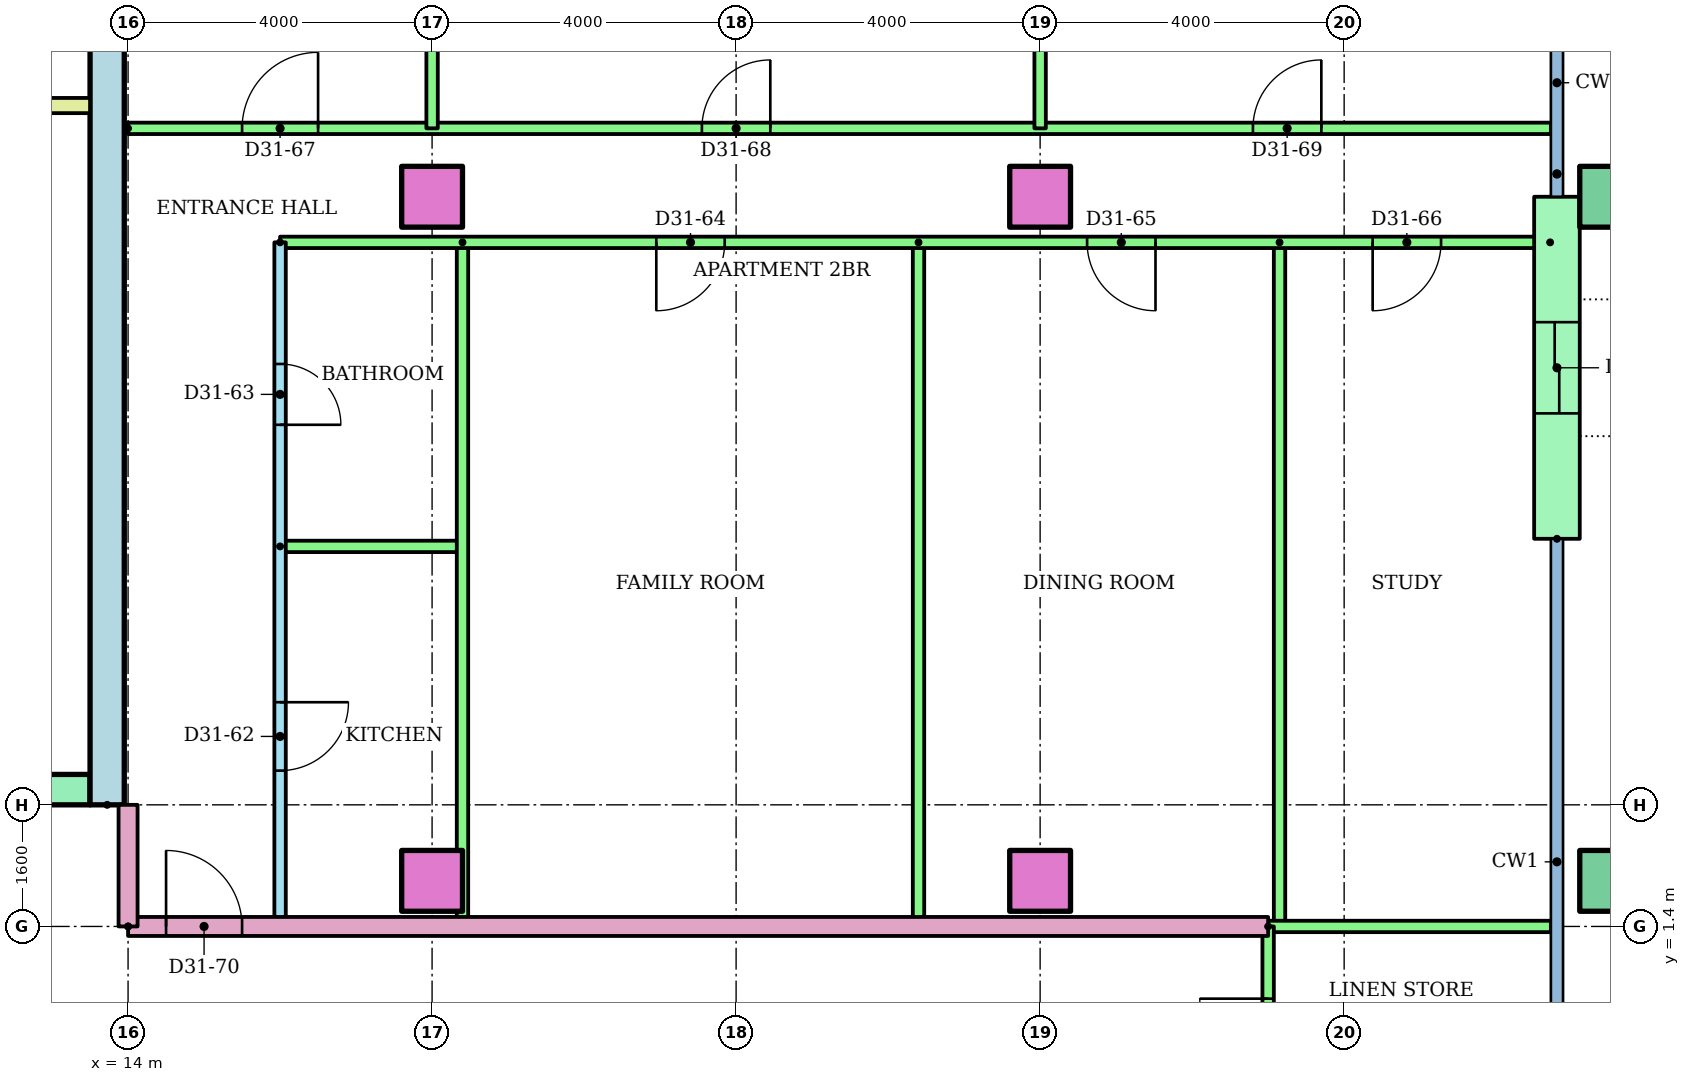
"""IFC4 building model, lengths in metres.
Left out: names, types, materials, properties, quantities, classifications, styles, units other than length and angle.
Written with IfcOpenShell. Run it as: python <this file> out.ifc"""

import sys

from ifc_helpers import new_model, si_unit, direction, frame, frame_2d, origin, origin_2d, place, context, subcontext, project, spatial, rectangle, hollow_rectangle, extrude, element, fill, save


model = new_model("IFC4")
c1 = context("Model", 3, precision=1e-05, world=origin(), true_north=direction((0.0, 1.0)))
c2 = subcontext(c1, "Body", "Model", "MODEL_VIEW")
j1 = project(units=[si_unit("LENGTHUNIT", "METRE"), si_unit("PLANEANGLEUNIT", "RADIAN")], contexts=[c1])
p1 = place(None, origin())
s1 = spatial("IfcSite", under=j1, at=p1, CompositionType="ELEMENT")
p2 = place(p1, origin())
s2 = spatial("IfcBuilding", under=s1, at=p2, CompositionType="ELEMENT")
p3 = place(p2, frame((0.0, 0.0, 123.0)))
s3 = spatial("IfcBuildingStorey", under=s2, at=p3, CompositionType="ELEMENT", Elevation=123.0)
for number, where in (
    (1, (18.0, 2.0, 0.0)),
    (2, (26.0, 2.0, 0.0)),
):
    element("IfcColumn", number, at=place(p3, frame(where)), inside=s3, PredefinedType="COLUMN", context=c2, shape_type="SweptSolid", body=[
        extrude(rectangle(XDim=0.8, YDim=0.8, at=origin_2d()), origin(), (0.0, 0.0, 1.0), 3.2),
    ])
p4 = place(p3, frame((33.5, 2.0, 0.0)))
e3 = element("IfcColumn", 3, at=p4, inside=s3, PredefinedType="COLUMN", context=c2, shape_type="SweptSolid", body=[
    extrude(hollow_rectangle(XDim=0.8, YDim=0.8, WallThickness=0.04, at=origin_2d()), origin(), (0.0, 0.0, 1.0), 3.2),
])
for number, where in (
    (4, (18.0, 11.0, 0.0)),
    (5, (26.0, 11.0, 0.0)),
):
    element("IfcColumn", number, at=place(p3, frame(where)), inside=s3, PredefinedType="COLUMN", context=c2, shape_type="SweptSolid", body=[
        extrude(rectangle(XDim=0.8, YDim=0.8, at=origin_2d()), origin(), (0.0, 0.0, 1.0), 3.2),
    ])
p5 = place(p3, frame((33.5, 11.0, 0.0)))
e6 = element("IfcColumn", 6, at=p5, inside=s3, PredefinedType="COLUMN", context=c2, shape_type="SweptSolid", body=[
    extrude(hollow_rectangle(XDim=0.8, YDim=0.8, WallThickness=0.04, at=origin_2d()), origin(), (0.0, 0.0, 1.0), 3.2),
])
p6 = place(p3, frame((32.8, 6.5, 0.0), z_axis=(0.0, 0.0, 1.0), x_axis=(0.0, 1.0, 0.0)))
e7 = element("IfcWall", 7, at=p6, inside=s3, PredefinedType="STANDARD", context=c2, shape_type="SweptSolid", body=[
    extrude(rectangle(XDim=4.5, YDim=0.6, at=frame_2d((2.25, 0.0))), origin(), (0.0, 0.0, 1.0), 2.92),
])
p7 = place(p6, frame((1.65, 0.0, 0.0)))
e8 = element("IfcOpeningElement", 8, at=p7, cuts=e7, PredefinedType="OPENING", context=c2, shape_type="SweptSolid", body=[
    extrude(rectangle(XDim=1.2, YDim=2.1, at=frame_2d((0.6, 1.05))), frame((0.0, 0.31, 0.0), z_axis=(0.0, -1.0, 0.0), x_axis=(1.0, 0.0, 0.0)), (0.0, 0.0, 1.0), 0.62),
])
p8 = place(p3, frame((13.725, 3.0, 0.0), z_axis=(0.0, 0.0, 1.0), x_axis=(0.0, 1.0, 0.0)))
e9 = element("IfcWall", 9, at=p8, inside=s3, PredefinedType="SHEAR", context=c2, shape_type="SweptSolid", body=[
    extrude(rectangle(XDim=17.0, YDim=0.45, at=frame_2d((8.5, 0.0))), origin(), (0.0, 0.0, 1.0), 2.92),
])
p9 = place(p3, frame((-13.5, 3.2, 0.0)))
e10 = element("IfcWall", 10, at=p9, inside=s3, PredefinedType="SHEAR", context=c2, shape_type="SweptSolid", body=[
    extrude(rectangle(XDim=27.0, YDim=0.4, at=frame_2d((13.5, 0.0))), origin(), (0.0, 0.0, 1.0), 2.92),
])
p10 = place(p9, frame((6.861, 0.0, 0.0)))
e11 = element("IfcOpeningElement", 11, at=p10, cuts=e10, PredefinedType="OPENING", context=c2, shape_type="SweptSolid", body=[
    extrude(rectangle(XDim=1.1, YDim=2.1, at=frame_2d((0.55, 1.05))), frame((0.0, 0.21, 0.0), z_axis=(0.0, -1.0, 0.0), x_axis=(1.0, 0.0, 0.0)), (0.0, 0.0, 1.0), 0.42),
])
p11 = place(p9, frame((9.906, 0.0, 0.0)))
e12 = element("IfcOpeningElement", 12, at=p11, cuts=e10, PredefinedType="OPENING", context=c2, shape_type="SweptSolid", body=[
    extrude(rectangle(XDim=1.1, YDim=2.1, at=frame_2d((0.55, 1.05))), frame((0.0, 0.21, 0.0), z_axis=(0.0, -1.0, 0.0), x_axis=(1.0, 0.0, 0.0)), (0.0, 0.0, 1.0), 0.42),
])
p12 = place(p9, frame((15.994, 0.0, 0.0)))
e13 = element("IfcOpeningElement", 13, at=p12, cuts=e10, PredefinedType="OPENING", context=c2, shape_type="SweptSolid", body=[
    extrude(rectangle(XDim=1.1, YDim=2.1, at=frame_2d((0.55, 1.05))), frame((0.0, 0.21, 0.0), z_axis=(0.0, -1.0, 0.0), x_axis=(1.0, 0.0, 0.0)), (0.0, 0.0, 1.0), 0.42),
])
p13 = place(p9, frame((19.039, 0.0, 0.0)))
e14 = element("IfcOpeningElement", 14, at=p13, cuts=e10, PredefinedType="OPENING", context=c2, shape_type="SweptSolid", body=[
    extrude(rectangle(XDim=1.1, YDim=2.1, at=frame_2d((0.55, 1.05))), frame((0.0, 0.21, 0.0), z_axis=(0.0, -1.0, 0.0), x_axis=(1.0, 0.0, 0.0)), (0.0, 0.0, 1.0), 0.42),
])
p14 = place(p9, frame((12.6, 0.0, 0.0)))
e15 = element("IfcOpeningElement", 15, at=p14, cuts=e10, PredefinedType="OPENING", context=c2, shape_type="SweptSolid", body=[
    extrude(rectangle(XDim=1.8, YDim=2.1, at=frame_2d((0.9, 1.05))), frame((0.0, 0.21, 0.0), z_axis=(0.0, -1.0, 0.0), x_axis=(1.0, 0.0, 0.0)), (0.0, 0.0, 1.0), 0.42),
])
p15 = place(p3, frame((9.6, 12.2, 0.0)))
e16 = element("IfcWall", 16, at=p15, inside=s3, PredefinedType="PARTITIONING", context=c2, shape_type="SweptSolid", body=[
    extrude(rectangle(XDim=3.9, YDim=0.2, at=frame_2d((1.95, 0.0))), origin(), (0.0, 0.0, 1.0), 2.92),
])
p16 = place(p3, frame((16.0, 10.4, 0.0), z_axis=(0.0, 0.0, 1.0), x_axis=(0.0, -1.0, 0.0)))
e17 = element("IfcWall", 17, at=p16, inside=s3, PredefinedType="PARTITIONING", context=c2, shape_type="SweptSolid", body=[
    extrude(rectangle(XDim=9.0, YDim=0.15, at=frame_2d((4.5, 0.0))), origin(), (0.0, 0.0, 1.0), 2.4),
])
p17 = place(p16, frame((6.05, 0.0, 0.0)))
e18 = element("IfcOpeningElement", 18, at=p17, cuts=e17, PredefinedType="OPENING", context=c2, shape_type="SweptSolid", body=[
    extrude(rectangle(XDim=0.9, YDim=2.1, at=frame_2d((0.45, 1.05))), frame((0.0, 0.085, 0.0), z_axis=(0.0, -1.0, 0.0), x_axis=(1.0, 0.0, 0.0)), (0.0, 0.0, 1.0), 0.17),
])
p18 = place(p16, frame((1.6, 0.0, 0.0)))
e19 = element("IfcOpeningElement", 19, at=p18, cuts=e17, PredefinedType="OPENING", context=c2, shape_type="SweptSolid", body=[
    extrude(rectangle(XDim=0.8, YDim=2.1, at=frame_2d((0.4, 1.05))), frame((0.0, 0.085, 0.0), z_axis=(0.0, -1.0, 0.0), x_axis=(1.0, 0.0, 0.0)), (0.0, 0.0, 1.0), 0.17),
])
p19 = place(p3, frame((16.0, 6.4, 0.0)))
e20 = element("IfcWall", 20, at=p19, inside=s3, PredefinedType="PARTITIONING", context=c2, shape_type="SweptSolid", body=[
    extrude(rectangle(XDim=2.4, YDim=0.15, at=frame_2d((1.2, 0.0))), origin(), (0.0, 0.0, 1.0), 2.4),
])
for number, where, z_axis, x_axis in (
    (21, (18.4, 10.4, 0.0), (0.0, 0.0, 1.0), (0.0, -1.0, 0.0)),
    (22, (24.4, 10.4, 0.0), (0.0, 0.0, 1.0), (0.0, -1.0, 0.0)),
    (23, (29.15, 10.4, 0.0), (0.0, 0.0, 1.0), (0.0, -1.0, 0.0)),
):
    element("IfcWall", number, at=place(p3, frame(where, z_axis=z_axis, x_axis=x_axis)), inside=s3, PredefinedType="PARTITIONING", context=c2, shape_type="SweptSolid", body=[
        extrude(rectangle(XDim=9.0, YDim=0.15, at=frame_2d((4.5, 0.0))), origin(), (0.0, 0.0, 1.0), 2.4),
    ])
p20 = place(p3, frame((32.71, 10.4, 0.0), z_axis=(0.0, 0.0, 1.0), x_axis=(-1.0, 0.0, 0.0)))
e24 = element("IfcWall", 24, at=p20, inside=s3, PredefinedType="PARTITIONING", context=c2, shape_type="SweptSolid", body=[
    extrude(rectangle(XDim=16.71, YDim=0.15, at=frame_2d((8.355, 0.0))), origin(), (0.0, 0.0, 1.0), 2.4),
])
p21 = place(p20, frame((10.86, 0.0, 0.0)))
e25 = element("IfcOpeningElement", 25, at=p21, cuts=e24, PredefinedType="OPENING", context=c2, shape_type="SweptSolid", body=[
    extrude(rectangle(XDim=0.9, YDim=2.1, at=frame_2d((0.45, 1.05))), frame((0.0, 0.085, 0.0), z_axis=(0.0, -1.0, 0.0), x_axis=(1.0, 0.0, 0.0)), (0.0, 0.0, 1.0), 0.17),
])
p22 = place(p20, frame((5.192, 0.0, 0.0)))
e26 = element("IfcOpeningElement", 26, at=p22, cuts=e24, PredefinedType="OPENING", context=c2, shape_type="SweptSolid", body=[
    extrude(rectangle(XDim=0.9, YDim=2.1, at=frame_2d((0.45, 1.05))), frame((0.0, 0.085, 0.0), z_axis=(0.0, -1.0, 0.0), x_axis=(1.0, 0.0, 0.0)), (0.0, 0.0, 1.0), 0.17),
])
p23 = place(p20, frame((1.435, 0.0, 0.0)))
e27 = element("IfcOpeningElement", 27, at=p23, cuts=e24, PredefinedType="OPENING", context=c2, shape_type="SweptSolid", body=[
    extrude(rectangle(XDim=0.9, YDim=2.1, at=frame_2d((0.45, 1.05))), frame((0.0, 0.085, 0.0), z_axis=(0.0, -1.0, 0.0), x_axis=(1.0, 0.0, 0.0)), (0.0, 0.0, 1.0), 0.17),
])
p24 = place(p3, frame((14.0, 11.9, 0.0)))
e28 = element("IfcWall", 28, at=p24, inside=s3, PredefinedType="PARTITIONING", context=c2, shape_type="SweptSolid", body=[
    extrude(rectangle(XDim=18.72, YDim=0.15, at=frame_2d((9.36, 0.0))), origin(), (0.0, 0.0, 1.0), 2.4),
])
p25 = place(p24, frame((1.5, 0.0, 0.0)))
e29 = element("IfcOpeningElement", 29, at=p25, cuts=e28, PredefinedType="OPENING", context=c2, shape_type="SweptSolid", body=[
    extrude(rectangle(XDim=1.0, YDim=2.1, at=frame_2d((0.5, 1.05))), frame((0.0, 0.085, 0.0), z_axis=(0.0, -1.0, 0.0), x_axis=(1.0, 0.0, 0.0)), (0.0, 0.0, 1.0), 0.17),
])
p26 = place(p24, frame((7.55, 0.0, 0.0)))
e30 = element("IfcOpeningElement", 30, at=p26, cuts=e28, PredefinedType="OPENING", context=c2, shape_type="SweptSolid", body=[
    extrude(rectangle(XDim=0.9, YDim=2.1, at=frame_2d((0.45, 1.05))), frame((0.0, 0.085, 0.0), z_axis=(0.0, -1.0, 0.0), x_axis=(1.0, 0.0, 0.0)), (0.0, 0.0, 1.0), 0.17),
])
p27 = place(p24, frame((14.8, 0.0, 0.0)))
e31 = element("IfcOpeningElement", 31, at=p27, cuts=e28, PredefinedType="OPENING", context=c2, shape_type="SweptSolid", body=[
    extrude(rectangle(XDim=0.9, YDim=2.1, at=frame_2d((0.45, 1.05))), frame((0.0, 0.085, 0.0), z_axis=(0.0, -1.0, 0.0), x_axis=(1.0, 0.0, 0.0)), (0.0, 0.0, 1.0), 0.17),
])
for number, where, z_axis, x_axis in (
    (32, (18.0, 18.721, 0.0), (0.0, 0.0, 1.0), (0.0, -1.0, 0.0)),
    (33, (26.0, 18.721, 0.0), (0.0, 0.0, 1.0), (0.0, -1.0, 0.0)),
):
    element("IfcWall", number, at=place(p3, frame(where, z_axis=z_axis, x_axis=x_axis)), inside=s3, PredefinedType="PARTITIONING", context=c2, shape_type="SweptSolid", body=[
        extrude(rectangle(XDim=6.821, YDim=0.15, at=frame_2d((3.411, 0.0))), origin(), (0.0, 0.0, 1.0), 2.4),
    ])
p28 = place(p3, frame((14.0, 1.4, 0.0)))
e34 = element("IfcWall", 34, at=p28, inside=s3, PredefinedType="PARTITIONING", context=c2, shape_type="SweptSolid", body=[
    extrude(rectangle(XDim=15.0, YDim=0.25, at=frame_2d((7.5, 0.0))), origin(), (0.0, 0.0, 1.0), 2.4),
])
p29 = place(p28, frame((0.5, 0.0, 0.0)))
e35 = element("IfcOpeningElement", 35, at=p29, cuts=e34, PredefinedType="OPENING", context=c2, shape_type="SweptSolid", body=[
    extrude(rectangle(XDim=1.0, YDim=2.1, at=frame_2d((0.5, 1.05))), frame((0.0, 0.135, 0.0), z_axis=(0.0, -1.0, 0.0), x_axis=(1.0, 0.0, 0.0)), (0.0, 0.0, 1.0), 0.27),
])
p30 = place(p3, frame((29.0, 1.4, 0.0)))
e36 = element("IfcWall", 36, at=p30, inside=s3, PredefinedType="PARTITIONING", context=c2, shape_type="SweptSolid", body=[
    extrude(rectangle(XDim=3.72, YDim=0.15, at=frame_2d((1.86, 0.0))), origin(), (0.0, 0.0, 1.0), 2.4),
])
p31 = place(p3, frame((29.0, -1.4, 0.0), z_axis=(0.0, 0.0, 1.0), x_axis=(0.0, 1.0, 0.0)))
e37 = element("IfcWall", 37, at=p31, inside=s3, PredefinedType="PARTITIONING", context=c2, shape_type="SweptSolid", body=[
    extrude(rectangle(XDim=2.8, YDim=0.15, at=frame_2d((1.4, 0.0))), origin(), (0.0, 0.0, 1.0), 2.4),
])
p32 = place(p31, frame((0.95, 0.0, 0.0)))
e38 = element("IfcOpeningElement", 38, at=p32, cuts=e37, PredefinedType="OPENING", context=c2, shape_type="SweptSolid", body=[
    extrude(rectangle(XDim=0.9, YDim=2.1, at=frame_2d((0.45, 1.05))), frame((0.0, 0.085, 0.0), z_axis=(0.0, -1.0, 0.0), x_axis=(1.0, 0.0, 0.0)), (0.0, 0.0, 1.0), 0.17),
])
p33 = place(p3, frame((14.0, 1.4, 0.0), z_axis=(0.0, 0.0, 1.0), x_axis=(0.0, 1.0, 0.0)))
e39 = element("IfcWall", 39, at=p33, inside=s3, PredefinedType="PARTITIONING", context=c2, shape_type="SweptSolid", body=[
    extrude(rectangle(XDim=1.6, YDim=0.25, at=frame_2d((0.8, 0.0))), origin(), (0.0, 0.0, 1.0), 2.4),
])
p34 = place(p17, origin())
e40 = element("IfcDoor", 40, at=p34, inside=s3, OperationType="SINGLE_SWING_LEFT", PredefinedType="DOOR", context=c2, shape_type="SweptSolid", body=[
    extrude(rectangle(XDim=0.9, YDim=2.1, at=frame_2d((0.45, 1.05))), frame((0.0, 0.025, 0.0), z_axis=(0.0, -1.0, 0.0), x_axis=(1.0, 0.0, 0.0)), (0.0, 0.0, 1.0), 0.05),
])
fill(e18, e40)
p35 = place(p18, origin())
e41 = element("IfcDoor", 41, at=p35, inside=s3, OperationType="SINGLE_SWING_RIGHT", PredefinedType="DOOR", context=c2, shape_type="SweptSolid", body=[
    extrude(rectangle(XDim=0.8, YDim=2.1, at=frame_2d((0.4, 1.05))), frame((0.0, 0.025, 0.0), z_axis=(0.0, -1.0, 0.0), x_axis=(1.0, 0.0, 0.0)), (0.0, 0.0, 1.0), 0.05),
])
fill(e19, e41)
p36 = place(p21, origin())
e42 = element("IfcDoor", 42, at=p36, inside=s3, OperationType="SINGLE_SWING_RIGHT", PredefinedType="DOOR", context=c2, shape_type="SweptSolid", body=[
    extrude(rectangle(XDim=0.9, YDim=2.1, at=frame_2d((0.45, 1.05))), frame((0.0, 0.025, 0.0), z_axis=(0.0, -1.0, 0.0), x_axis=(1.0, 0.0, 0.0)), (0.0, 0.0, 1.0), 0.05),
])
fill(e25, e42)
p37 = place(p22, origin())
e43 = element("IfcDoor", 43, at=p37, inside=s3, OperationType="SINGLE_SWING_LEFT", PredefinedType="DOOR", context=c2, shape_type="SweptSolid", body=[
    extrude(rectangle(XDim=0.9, YDim=2.1, at=frame_2d((0.45, 1.05))), frame((0.0, 0.025, 0.0), z_axis=(0.0, -1.0, 0.0), x_axis=(1.0, 0.0, 0.0)), (0.0, 0.0, 1.0), 0.05),
])
fill(e26, e43)
p38 = place(p23, origin())
e44 = element("IfcDoor", 44, at=p38, inside=s3, OperationType="SINGLE_SWING_RIGHT", PredefinedType="DOOR", context=c2, shape_type="SweptSolid", body=[
    extrude(rectangle(XDim=0.9, YDim=2.1, at=frame_2d((0.45, 1.05))), frame((0.0, 0.025, 0.0), z_axis=(0.0, -1.0, 0.0), x_axis=(1.0, 0.0, 0.0)), (0.0, 0.0, 1.0), 0.05),
])
fill(e27, e44)
p39 = place(p25, origin())
e45 = element("IfcDoor", 45, at=p39, inside=s3, OperationType="SINGLE_SWING_RIGHT", PredefinedType="DOOR", context=c2, shape_type="SweptSolid", body=[
    extrude(rectangle(XDim=1.0, YDim=2.1, at=frame_2d((0.5, 1.05))), frame((0.0, 0.025, 0.0), z_axis=(0.0, -1.0, 0.0), x_axis=(1.0, 0.0, 0.0)), (0.0, 0.0, 1.0), 0.05),
])
fill(e29, e45)
p40 = place(p26, origin())
e46 = element("IfcDoor", 46, at=p40, inside=s3, OperationType="SINGLE_SWING_RIGHT", PredefinedType="DOOR", context=c2, shape_type="SweptSolid", body=[
    extrude(rectangle(XDim=0.9, YDim=2.1, at=frame_2d((0.45, 1.05))), frame((0.0, 0.025, 0.0), z_axis=(0.0, -1.0, 0.0), x_axis=(1.0, 0.0, 0.0)), (0.0, 0.0, 1.0), 0.05),
])
fill(e30, e46)
p41 = place(p27, origin())
e47 = element("IfcDoor", 47, at=p41, inside=s3, OperationType="SINGLE_SWING_RIGHT", PredefinedType="DOOR", context=c2, shape_type="SweptSolid", body=[
    extrude(rectangle(XDim=0.9, YDim=2.1, at=frame_2d((0.45, 1.05))), frame((0.0, 0.025, 0.0), z_axis=(0.0, -1.0, 0.0), x_axis=(1.0, 0.0, 0.0)), (0.0, 0.0, 1.0), 0.05),
])
fill(e31, e47)
p42 = place(p29, origin())
e48 = element("IfcDoor", 48, at=p42, inside=s3, OperationType="SINGLE_SWING_LEFT", PredefinedType="DOOR", context=c2, shape_type="SweptSolid", body=[
    extrude(rectangle(XDim=1.0, YDim=2.1, at=frame_2d((0.5, 1.05))), frame((0.0, 0.025, 0.0), z_axis=(0.0, -1.0, 0.0), x_axis=(1.0, 0.0, 0.0)), (0.0, 0.0, 1.0), 0.05),
])
fill(e35, e48)
p43 = place(p32, origin())
e49 = element("IfcDoor", 49, at=p43, inside=s3, OperationType="SINGLE_SWING_RIGHT", PredefinedType="DOOR", context=c2, shape_type="SweptSolid", body=[
    extrude(rectangle(XDim=0.9, YDim=2.1, at=frame_2d((0.45, 1.05))), frame((0.0, 0.025, 0.0), z_axis=(0.0, -1.0, 0.0), x_axis=(1.0, 0.0, 0.0)), (0.0, 0.0, 1.0), 0.05),
])
fill(e38, e49)
p44 = place(p7, origin())
e50 = element("IfcDoor", 50, at=p44, inside=s3, OperationType="SLIDING_TO_LEFT", PredefinedType="DOOR", context=c2, shape_type="SweptSolid", body=[
    extrude(rectangle(XDim=1.2, YDim=2.1, at=frame_2d((0.6, 1.05))), frame((0.0, 0.025, 0.0), z_axis=(0.0, -1.0, 0.0), x_axis=(1.0, 0.0, 0.0)), (0.0, 0.0, 1.0), 0.05),
])
fill(e8, e50)
save(model, sys.argv[1])
